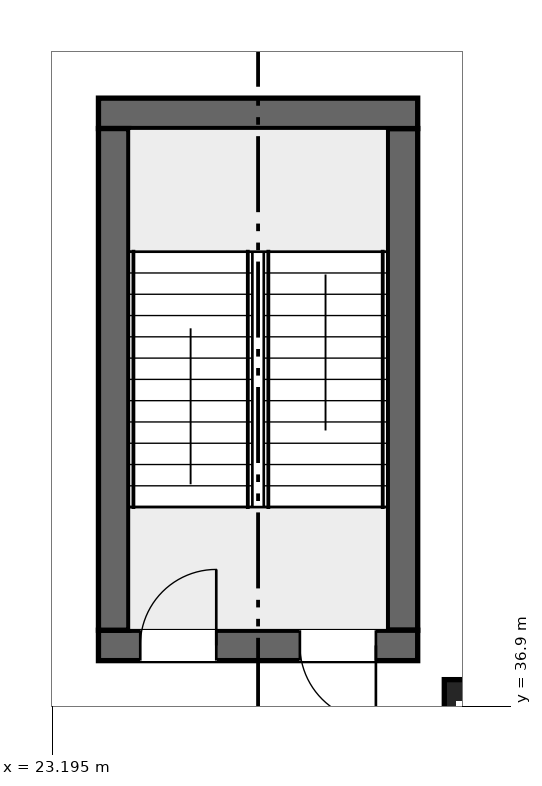
"""IFC4 building model, lengths in metres.
Left out: names, types, materials, properties, quantities, classifications, styles, units other than length and angle.
Written with IfcOpenShell. Run it as: python <this file> out.ifc"""

import sys

from ifc_helpers import new_model, si_unit, direction, frame, frame_2d, origin, origin_2d, place, context, subcontext, project, spatial, rectangle, extrude, element, fill, save


model = new_model("IFC4")
c1 = context("Model", 3, precision=1e-05, world=origin(), true_north=direction((0.0, 1.0)))
c2 = subcontext(c1, "Body", "Model", "MODEL_VIEW")
j1 = project(units=[si_unit("LENGTHUNIT", "METRE"), si_unit("PLANEANGLEUNIT", "RADIAN")], contexts=[c1])
p1 = place(None, origin())
s1 = spatial("IfcSite", under=j1, at=p1, CompositionType="ELEMENT")
p2 = place(p1, origin())
s2 = spatial("IfcBuilding", under=s1, at=p2, CompositionType="ELEMENT")
p3 = place(p2, frame((0.0, 0.0, 31.9)))
s3 = spatial("IfcBuildingStorey", under=s2, at=p3, CompositionType="ELEMENT", Elevation=31.9)
p4 = place(p3, frame((23.8, 37.7, 0.0), z_axis=(0.0, 0.0, 1.0), x_axis=(1.0, 0.0, 0.0)))
e1 = element("IfcWall", 1, at=p4, inside=s3, PredefinedType="SHEAR", context=c2, shape_type="SweptSolid", body=[
    extrude(rectangle(XDim=4.2, YDim=0.4, at=frame_2d((2.1, 0.0))), origin(), (0.0, 0.0, 1.0), 4.2),
])
p5 = place(p4, frame((0.55, 0.0, 0.0)))
e2 = element("IfcOpeningElement", 2, at=p5, cuts=e1, PredefinedType="OPENING", context=c2, shape_type="SweptSolid", body=[
    extrude(rectangle(XDim=1.0, YDim=2.1, at=frame_2d((0.5, 1.05))), frame((0.0, 0.21, 0.0), z_axis=(0.0, -1.0, 0.0), x_axis=(1.0, 0.0, 0.0)), (0.0, 0.0, 1.0), 0.42),
])
p6 = place(p4, frame((2.65, 0.0, 0.0)))
e3 = element("IfcOpeningElement", 3, at=p6, cuts=e1, PredefinedType="OPENING", context=c2, shape_type="SweptSolid", body=[
    extrude(rectangle(XDim=1.0, YDim=2.1, at=frame_2d((0.5, 1.05))), frame((0.0, 0.21, 0.0), z_axis=(0.0, -1.0, 0.0), x_axis=(1.0, 0.0, 0.0)), (0.0, 0.0, 1.0), 0.42),
])
p7 = place(p3, frame((23.8, 44.7, 0.0), z_axis=(0.0, 0.0, 1.0), x_axis=(1.0, 0.0, 0.0)))
e4 = element("IfcWall", 4, at=p7, inside=s3, PredefinedType="SHEAR", context=c2, shape_type="SweptSolid", body=[
    extrude(rectangle(XDim=4.2, YDim=0.4, at=frame_2d((2.1, 0.0))), origin(), (0.0, 0.0, 1.0), 4.2),
])
for number, where, z_axis, x_axis in (
    (5, (24.0, 37.9, 0.0), (0.0, 0.0, 1.0), (0.0, 1.0, 0.0)),
    (6, (27.8, 37.9, 0.0), (0.0, 0.0, 1.0), (0.0, 1.0, 0.0)),
):
    element("IfcWall", number, at=place(p3, frame(where, z_axis=z_axis, x_axis=x_axis)), inside=s3, PredefinedType="SHEAR", context=c2, shape_type="SweptSolid", body=[
        extrude(rectangle(XDim=6.6, YDim=0.4, at=frame_2d((3.3, 0.0))), origin(), (0.0, 0.0, 1.0), 4.2),
    ])
p8 = place(p3, frame((28.8, 36.8, 0.0), z_axis=(0.0, 0.0, 1.0), x_axis=(1.0, 0.0, 0.0)))
e7 = element("IfcColumn", 7, at=p8, inside=s3, PredefinedType="COLUMN", context=c2, shape_type="SweptSolid", body=[
    extrude(rectangle(XDim=0.9, YDim=0.9, at=origin_2d()), origin(), (0.0, 0.0, 1.0), 4.2),
])
p9 = place(p5, origin())
e8 = element("IfcDoor", 8, at=p9, inside=s3, OperationType="SINGLE_SWING_RIGHT", PredefinedType="DOOR", context=c2, shape_type="SweptSolid", body=[
    extrude(rectangle(XDim=1.0, YDim=2.1, at=frame_2d((0.5, 1.05))), frame((0.0, 0.025, 0.0), z_axis=(0.0, -1.0, 0.0), x_axis=(1.0, 0.0, 0.0)), (0.0, 0.0, 1.0), 0.05),
])
fill(e2, e8)
p10 = place(p6, origin())
e9 = element("IfcDoor", 9, at=p10, inside=s3, OperationType="SINGLE_SWING_LEFT", PredefinedType="DOOR", context=c2, shape_type="SweptSolid", body=[
    extrude(rectangle(XDim=1.0, YDim=2.1, at=frame_2d((0.5, 1.05))), frame((0.0, 0.025, 0.0), z_axis=(0.0, -1.0, 0.0), x_axis=(1.0, 0.0, 0.0)), (0.0, 0.0, 1.0), 0.05),
])
fill(e3, e9)
save(model, sys.argv[1])
